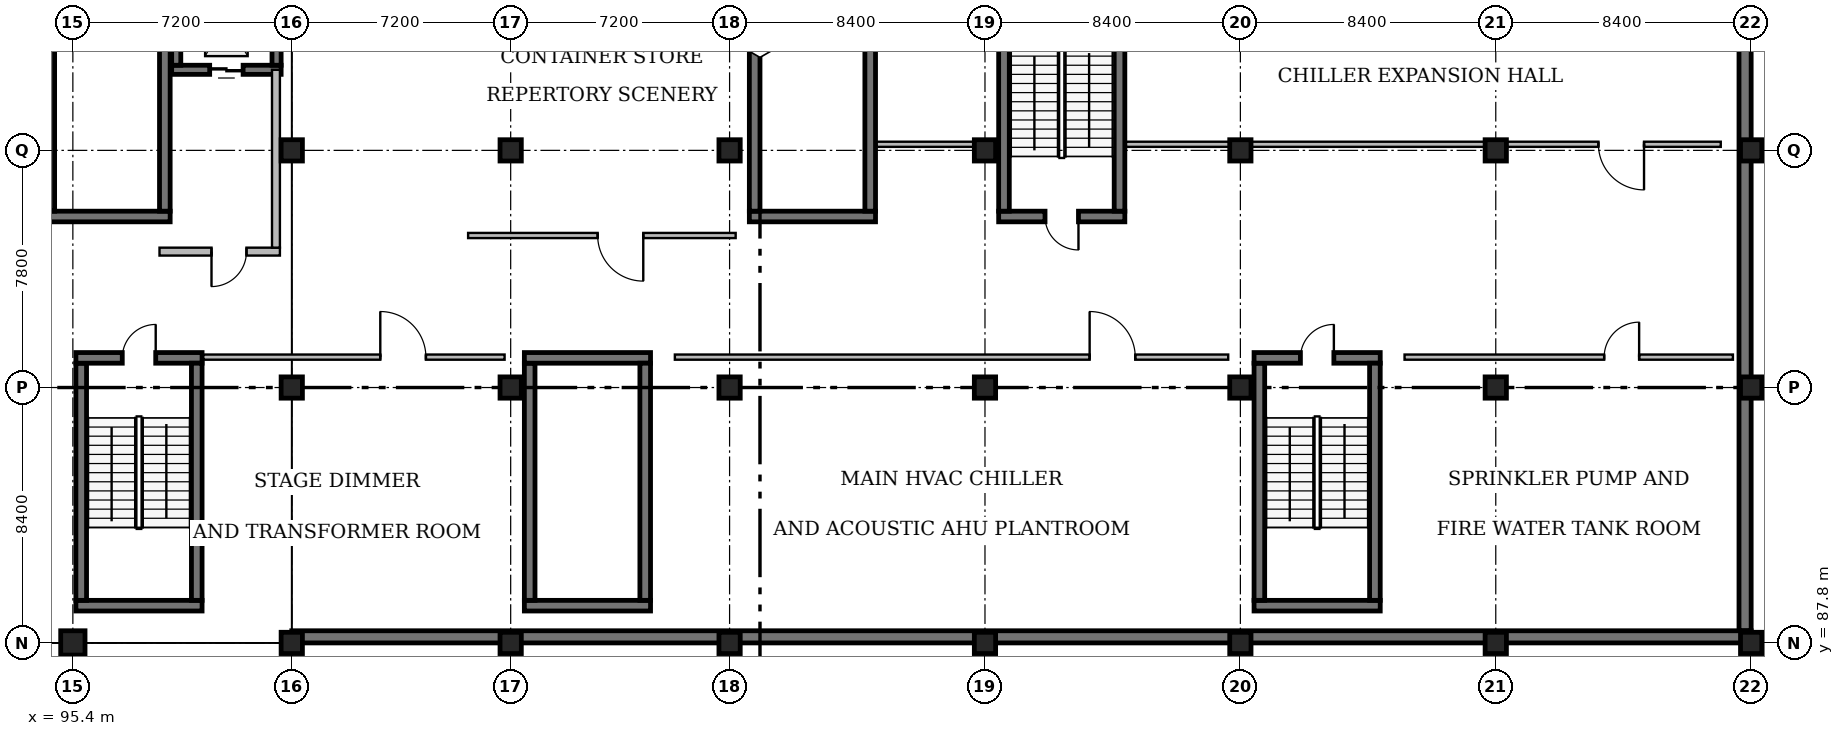
"""IFC4 building model, lengths in metres.
Left out: names, types, materials, properties, quantities, classifications, styles, units other than length and angle.
Written with IfcOpenShell. Run it as: python <this file> out.ifc"""

import sys

from ifc_helpers import new_model, si_unit, direction, frame, frame_2d, origin, origin_2d, place, context, subcontext, project, spatial, rectangle, extrude, element, fill, save


model = new_model("IFC4")
c1 = context("Model", 3, precision=1e-05, world=origin(), true_north=direction((0.0, 1.0)))
c2 = subcontext(c1, "Body", "Model", "MODEL_VIEW")
j1 = project(units=[si_unit("LENGTHUNIT", "METRE"), si_unit("PLANEANGLEUNIT", "RADIAN")], contexts=[c1])
p1 = place(None, origin())
s1 = spatial("IfcSite", under=j1, at=p1, CompositionType="ELEMENT")
p2 = place(p1, origin())
s2 = spatial("IfcBuilding", under=s1, at=p2, CompositionType="ELEMENT")
p3 = place(p2, frame((0.0, 0.0, -4.8)))
s3 = spatial("IfcBuildingStorey", under=s2, at=p3, CompositionType="ELEMENT", Elevation=-4.8)
p4 = place(p3, frame((95.4, 87.8, 0.0), z_axis=(0.0, 0.0, 1.0), x_axis=(1.0, 0.0, 0.0)))
e1 = element("IfcColumn", 1, at=p4, inside=s3, PredefinedType="COLUMN", context=c2, shape_type="SweptSolid", body=[
    extrude(rectangle(XDim=0.8, YDim=0.8, at=origin_2d()), origin(), (0.0, 0.0, 1.0), 4.8),
])
for number, where, z_axis, x_axis in (
    (2, (102.6, 87.8, 0.0), (0.0, 0.0, 1.0), (1.0, 0.0, 0.0)),
    (3, (102.6, 96.2, 0.0), (0.0, 0.0, 1.0), (1.0, 0.0, 0.0)),
    (4, (102.6, 104.0, 0.0), (0.0, 0.0, 1.0), (1.0, 0.0, 0.0)),
    (5, (109.8, 87.8, 0.0), (0.0, 0.0, 1.0), (1.0, 0.0, 0.0)),
    (6, (109.8, 96.2, 0.0), (0.0, 0.0, 1.0), (1.0, 0.0, 0.0)),
    (7, (109.8, 104.0, 0.0), (0.0, 0.0, 1.0), (1.0, 0.0, 0.0)),
    (8, (117.0, 87.8, 0.0), (0.0, 0.0, 1.0), (1.0, 0.0, 0.0)),
    (9, (117.0, 96.2, 0.0), (0.0, 0.0, 1.0), (1.0, 0.0, 0.0)),
    (10, (117.0, 104.0, 0.0), (0.0, 0.0, 1.0), (1.0, 0.0, 0.0)),
    (11, (125.4, 87.8, 0.0), (0.0, 0.0, 1.0), (1.0, 0.0, 0.0)),
    (12, (125.4, 96.2, 0.0), (0.0, 0.0, 1.0), (1.0, 0.0, 0.0)),
    (13, (125.4, 104.0, 0.0), (0.0, 0.0, 1.0), (1.0, 0.0, 0.0)),
    (14, (133.8, 87.8, 0.0), (0.0, 0.0, 1.0), (1.0, 0.0, 0.0)),
    (15, (133.8, 96.2, 0.0), (0.0, 0.0, 1.0), (1.0, 0.0, 0.0)),
    (16, (133.8, 104.0, 0.0), (0.0, 0.0, 1.0), (1.0, 0.0, 0.0)),
    (17, (142.2, 87.8, 0.0), (0.0, 0.0, 1.0), (1.0, 0.0, 0.0)),
    (18, (142.2, 96.2, 0.0), (0.0, 0.0, 1.0), (1.0, 0.0, 0.0)),
    (19, (142.2, 104.0, 0.0), (0.0, 0.0, 1.0), (1.0, 0.0, 0.0)),
    (20, (150.6, 87.8, 0.0), (0.0, 0.0, 1.0), (1.0, 0.0, 0.0)),
    (21, (150.6, 96.2, 0.0), (0.0, 0.0, 1.0), (1.0, 0.0, 0.0)),
    (22, (150.6, 104.0, 0.0), (0.0, 0.0, 1.0), (1.0, 0.0, 0.0)),
):
    element("IfcColumn", number, at=place(p3, frame(where, z_axis=z_axis, x_axis=x_axis)), inside=s3, PredefinedType="COLUMN", context=c2, shape_type="SweptSolid", body=[
        extrude(rectangle(XDim=0.7, YDim=0.7, at=origin_2d()), origin(), (0.0, 0.0, 1.0), 4.8),
    ])
p5 = place(p3, frame((98.6, 101.825, 0.0), z_axis=(0.0, 0.0, 1.0), x_axis=(-1.0, 0.0, 0.0)))
e23 = element("IfcWall", 23, at=p5, inside=s3, PredefinedType="SOLIDWALL", context=c2, shape_type="SweptSolid", body=[
    extrude(rectangle(XDim=4.15, YDim=0.35, at=frame_2d((2.075, 0.0))), origin(), (0.0, 0.0, 1.0), 4.48),
])
for number, where, z_axis, x_axis in (
    (24, (94.625, 102.0, 0.0), (0.0, 0.0, 1.0), (0.0, 1.0, 0.0)),
    (25, (98.425, 109.8, 0.0), (0.0, 0.0, 1.0), (0.0, -1.0, 0.0)),
):
    element("IfcWall", number, at=place(p3, frame(where, z_axis=z_axis, x_axis=x_axis)), inside=s3, PredefinedType="SOLIDWALL", context=c2, shape_type="SweptSolid", body=[
        extrude(rectangle(XDim=7.8, YDim=0.35, at=frame_2d((3.9, 0.0))), origin(), (0.0, 0.0, 1.0), 4.48),
    ])
p6 = place(p3, frame((99.65, 89.025, 0.0), z_axis=(0.0, 0.0, 1.0), x_axis=(-1.0, 0.0, 0.0)))
e26 = element("IfcWall", 26, at=p6, inside=s3, PredefinedType="SOLIDWALL", context=c2, shape_type="SweptSolid", body=[
    extrude(rectangle(XDim=4.15, YDim=0.35, at=frame_2d((2.075, 0.0))), origin(), (0.0, 0.0, 1.0), 4.56),
])
p7 = place(p3, frame((95.675, 89.2, 0.0), z_axis=(0.0, 0.0, 1.0), x_axis=(0.0, 1.0, 0.0)))
e27 = element("IfcWall", 27, at=p7, inside=s3, PredefinedType="SOLIDWALL", context=c2, shape_type="SweptSolid", body=[
    extrude(rectangle(XDim=7.8, YDim=0.35, at=frame_2d((3.9, 0.0))), origin(), (0.0, 0.0, 1.0), 4.56),
])
p8 = place(p3, frame((95.5, 97.175, 0.0), z_axis=(0.0, 0.0, 1.0), x_axis=(1.0, 0.0, 0.0)))
e28 = element("IfcWall", 28, at=p8, inside=s3, PredefinedType="SOLIDWALL", context=c2, shape_type="SweptSolid", body=[
    extrude(rectangle(XDim=4.15, YDim=0.35, at=frame_2d((2.075, 0.0))), origin(), (0.0, 0.0, 1.0), 4.56),
])
p9 = place(p8, frame((1.525, 0.0, 0.0)))
e29 = element("IfcOpeningElement", 29, at=p9, cuts=e28, PredefinedType="OPENING", context=c2, shape_type="SweptSolid", body=[
    extrude(rectangle(XDim=1.1, YDim=2.15, at=frame_2d((0.55, 1.075))), frame((0.0, 0.195, 0.0), z_axis=(0.0, -1.0, 0.0), x_axis=(1.0, 0.0, 0.0)), (0.0, 0.0, 1.0), 0.39),
])
p10 = place(p3, frame((99.475, 97.0, 0.0), z_axis=(0.0, 0.0, 1.0), x_axis=(0.0, -1.0, 0.0)))
e30 = element("IfcWall", 30, at=p10, inside=s3, PredefinedType="SOLIDWALL", context=c2, shape_type="SweptSolid", body=[
    extrude(rectangle(XDim=7.8, YDim=0.35, at=frame_2d((3.9, 0.0))), origin(), (0.0, 0.0, 1.0), 4.56),
])
p11 = place(p3, frame((102.25, 106.65, 0.0), z_axis=(0.0, 0.0, 1.0), x_axis=(-1.0, 0.0, 0.0)))
e31 = element("IfcWall", 31, at=p11, inside=s3, PredefinedType="SOLIDWALL", context=c2, shape_type="SweptSolid", body=[
    extrude(rectangle(XDim=3.6, YDim=0.3, at=frame_2d((1.8, 0.0))), origin(), (0.0, 0.0, 1.0), 4.8),
])
p12 = place(p11, frame((1.25, 0.0, 0.0)))
e32 = element("IfcOpeningElement", 32, at=p12, cuts=e31, PredefinedType="OPENING", context=c2, shape_type="SweptSolid", body=[
    extrude(rectangle(XDim=1.1, YDim=2.1, at=frame_2d((0.55, 1.05))), frame((0.0, 0.17, 0.0), z_axis=(0.0, -1.0, 0.0), x_axis=(1.0, 0.0, 0.0)), (0.0, 0.0, 1.0), 0.34),
])
for number, where, z_axis, x_axis in (
    (33, (98.8, 106.8, 0.0), (0.0, 0.0, 1.0), (0.0, 1.0, 0.0)),
    (34, (102.1, 109.8, 0.0), (0.0, 0.0, 1.0), (0.0, -1.0, 0.0)),
):
    element("IfcWall", number, at=place(p3, frame(where, z_axis=z_axis, x_axis=x_axis)), inside=s3, PredefinedType="SOLIDWALL", context=c2, shape_type="SweptSolid", body=[
        extrude(rectangle(XDim=3.0, YDim=0.3, at=frame_2d((1.5, 0.0))), origin(), (0.0, 0.0, 1.0), 4.8),
    ])
p13 = place(p3, frame((102.21, 100.67, 0.0), z_axis=(0.0, 0.0, 1.0), x_axis=(-1.0, 0.0, 0.0)))
e35 = element("IfcWall", 35, at=p13, inside=s3, PredefinedType="SOLIDWALL", context=c2, shape_type="SweptSolid", body=[
    extrude(rectangle(XDim=3.96, YDim=0.26, at=frame_2d((1.98, 0.0))), origin(), (0.0, 0.0, 1.0), 4.48),
])
p14 = place(p13, frame((1.1, 0.0, 0.0)))
e36 = element("IfcOpeningElement", 36, at=p14, cuts=e35, PredefinedType="OPENING", context=c2, shape_type="SweptSolid", body=[
    extrude(rectangle(XDim=1.15, YDim=2.2, at=frame_2d((0.575, 1.1))), frame((0.0, 0.15, 0.0), z_axis=(0.0, -1.0, 0.0), x_axis=(1.0, 0.0, 0.0)), (0.0, 0.0, 1.0), 0.3),
])
p15 = place(p3, frame((102.08, 106.65, 0.0), z_axis=(0.0, 0.0, 1.0), x_axis=(0.0, -1.0, 0.0)))
e37 = element("IfcWall", 37, at=p15, inside=s3, PredefinedType="SOLIDWALL", context=c2, shape_type="SweptSolid", body=[
    extrude(rectangle(XDim=5.85, YDim=0.26, at=frame_2d((2.925, 0.0))), origin(), (0.0, 0.0, 1.0), 4.48),
])
p16 = place(p3, frame((121.8, 101.825, 0.0), z_axis=(0.0, 0.0, 1.0), x_axis=(-1.0, 0.0, 0.0)))
e38 = element("IfcWall", 38, at=p16, inside=s3, PredefinedType="SOLIDWALL", context=c2, shape_type="SweptSolid", body=[
    extrude(rectangle(XDim=4.15, YDim=0.35, at=frame_2d((2.075, 0.0))), origin(), (0.0, 0.0, 1.0), 4.48),
])
for number, where, z_axis, x_axis in (
    (39, (117.825, 102.0, 0.0), (0.0, 0.0, 1.0), (0.0, 1.0, 0.0)),
    (40, (121.625, 109.8, 0.0), (0.0, 0.0, 1.0), (0.0, -1.0, 0.0)),
):
    element("IfcWall", number, at=place(p3, frame(where, z_axis=z_axis, x_axis=x_axis)), inside=s3, PredefinedType="SOLIDWALL", context=c2, shape_type="SweptSolid", body=[
        extrude(rectangle(XDim=7.8, YDim=0.35, at=frame_2d((3.9, 0.0))), origin(), (0.0, 0.0, 1.0), 4.48),
    ])
p17 = place(p3, frame((130.0, 101.825, 0.0), z_axis=(0.0, 0.0, 1.0), x_axis=(-1.0, 0.0, 0.0)))
e41 = element("IfcWall", 41, at=p17, inside=s3, PredefinedType="SOLIDWALL", context=c2, shape_type="SweptSolid", body=[
    extrude(rectangle(XDim=4.15, YDim=0.35, at=frame_2d((2.075, 0.0))), origin(), (0.0, 0.0, 1.0), 4.56),
])
p18 = place(p17, frame((1.525, 0.0, 0.0)))
e42 = element("IfcOpeningElement", 42, at=p18, cuts=e41, PredefinedType="OPENING", context=c2, shape_type="SweptSolid", body=[
    extrude(rectangle(XDim=1.1, YDim=2.15, at=frame_2d((0.55, 1.075))), frame((0.0, 0.195, 0.0), z_axis=(0.0, -1.0, 0.0), x_axis=(1.0, 0.0, 0.0)), (0.0, 0.0, 1.0), 0.39),
])
for number, where, z_axis, x_axis in (
    (43, (126.025, 102.0, 0.0), (0.0, 0.0, 1.0), (0.0, 1.0, 0.0)),
    (44, (129.825, 109.8, 0.0), (0.0, 0.0, 1.0), (0.0, -1.0, 0.0)),
):
    element("IfcWall", number, at=place(p3, frame(where, z_axis=z_axis, x_axis=x_axis)), inside=s3, PredefinedType="SOLIDWALL", context=c2, shape_type="SweptSolid", body=[
        extrude(rectangle(XDim=7.8, YDim=0.35, at=frame_2d((3.9, 0.0))), origin(), (0.0, 0.0, 1.0), 4.56),
    ])
p19 = place(p3, frame((114.4, 89.025, 0.0), z_axis=(0.0, 0.0, 1.0), x_axis=(-1.0, 0.0, 0.0)))
e45 = element("IfcWall", 45, at=p19, inside=s3, PredefinedType="SOLIDWALL", context=c2, shape_type="SweptSolid", body=[
    extrude(rectangle(XDim=4.15, YDim=0.35, at=frame_2d((2.075, 0.0))), origin(), (0.0, 0.0, 1.0), 4.48),
])
p20 = place(p3, frame((110.425, 89.2, 0.0), z_axis=(0.0, 0.0, 1.0), x_axis=(0.0, 1.0, 0.0)))
e46 = element("IfcWall", 46, at=p20, inside=s3, PredefinedType="SOLIDWALL", context=c2, shape_type="SweptSolid", body=[
    extrude(rectangle(XDim=7.8, YDim=0.35, at=frame_2d((3.9, 0.0))), origin(), (0.0, 0.0, 1.0), 4.48),
])
p21 = place(p3, frame((110.25, 97.175, 0.0), z_axis=(0.0, 0.0, 1.0), x_axis=(1.0, 0.0, 0.0)))
e47 = element("IfcWall", 47, at=p21, inside=s3, PredefinedType="SOLIDWALL", context=c2, shape_type="SweptSolid", body=[
    extrude(rectangle(XDim=4.15, YDim=0.35, at=frame_2d((2.075, 0.0))), origin(), (0.0, 0.0, 1.0), 4.48),
])
p22 = place(p3, frame((114.225, 97.0, 0.0), z_axis=(0.0, 0.0, 1.0), x_axis=(0.0, -1.0, 0.0)))
e48 = element("IfcWall", 48, at=p22, inside=s3, PredefinedType="SOLIDWALL", context=c2, shape_type="SweptSolid", body=[
    extrude(rectangle(XDim=7.8, YDim=0.35, at=frame_2d((3.9, 0.0))), origin(), (0.0, 0.0, 1.0), 4.48),
])
p23 = place(p3, frame((138.4, 89.025, 0.0), z_axis=(0.0, 0.0, 1.0), x_axis=(-1.0, 0.0, 0.0)))
e49 = element("IfcWall", 49, at=p23, inside=s3, PredefinedType="SOLIDWALL", context=c2, shape_type="SweptSolid", body=[
    extrude(rectangle(XDim=4.15, YDim=0.35, at=frame_2d((2.075, 0.0))), origin(), (0.0, 0.0, 1.0), 4.56),
])
p24 = place(p3, frame((134.425, 89.2, 0.0), z_axis=(0.0, 0.0, 1.0), x_axis=(0.0, 1.0, 0.0)))
e50 = element("IfcWall", 50, at=p24, inside=s3, PredefinedType="SOLIDWALL", context=c2, shape_type="SweptSolid", body=[
    extrude(rectangle(XDim=7.8, YDim=0.35, at=frame_2d((3.9, 0.0))), origin(), (0.0, 0.0, 1.0), 4.56),
])
p25 = place(p3, frame((134.25, 97.175, 0.0), z_axis=(0.0, 0.0, 1.0), x_axis=(1.0, 0.0, 0.0)))
e51 = element("IfcWall", 51, at=p25, inside=s3, PredefinedType="SOLIDWALL", context=c2, shape_type="SweptSolid", body=[
    extrude(rectangle(XDim=4.15, YDim=0.35, at=frame_2d((2.075, 0.0))), origin(), (0.0, 0.0, 1.0), 4.56),
])
p26 = place(p25, frame((1.525, 0.0, 0.0)))
e52 = element("IfcOpeningElement", 52, at=p26, cuts=e51, PredefinedType="OPENING", context=c2, shape_type="SweptSolid", body=[
    extrude(rectangle(XDim=1.1, YDim=2.15, at=frame_2d((0.55, 1.075))), frame((0.0, 0.195, 0.0), z_axis=(0.0, -1.0, 0.0), x_axis=(1.0, 0.0, 0.0)), (0.0, 0.0, 1.0), 0.39),
])
p27 = place(p3, frame((138.225, 97.0, 0.0), z_axis=(0.0, 0.0, 1.0), x_axis=(0.0, -1.0, 0.0)))
e53 = element("IfcWall", 53, at=p27, inside=s3, PredefinedType="SOLIDWALL", context=c2, shape_type="SweptSolid", body=[
    extrude(rectangle(XDim=7.8, YDim=0.35, at=frame_2d((3.9, 0.0))), origin(), (0.0, 0.0, 1.0), 4.56),
])
p28 = place(p3, frame((150.4, 88.2, 0.0), z_axis=(0.0, 0.0, 1.0), x_axis=(0.0, 1.0, 0.0)))
e54 = element("IfcWall", 54, at=p28, inside=s3, PredefinedType="SOLIDWALL", context=c2, shape_type="SweptSolid", body=[
    extrude(rectangle(XDim=23.2, YDim=0.4, at=frame_2d((11.6, 0.0))), origin(), (0.0, 0.0, 1.0), 4.48),
])
p29 = place(p3, frame((102.6, 88.0, 0.0), z_axis=(0.0, 0.0, 1.0), x_axis=(1.0, 0.0, 0.0)))
e55 = element("IfcWall", 55, at=p29, inside=s3, PredefinedType="SOLIDWALL", context=c2, shape_type="SweptSolid", body=[
    extrude(rectangle(XDim=48.0, YDim=0.4, at=frame_2d((24.0, 0.0))), origin(), (0.0, 0.0, 1.0), 4.48),
])
p30 = place(p3, frame((99.69, 97.2, 0.0), z_axis=(0.0, 0.0, 1.0), x_axis=(1.0, 0.0, 0.0)))
e56 = element("IfcWall", 56, at=p30, inside=s3, PredefinedType="PARTITIONING", context=c2, shape_type="SweptSolid", body=[
    extrude(rectangle(XDim=9.91, YDim=0.17, at=frame_2d((4.955, 0.0))), origin(), (0.0, 0.0, 1.0), 4.48),
])
p31 = place(p30, frame((5.822, 0.0, 0.0)))
e57 = element("IfcOpeningElement", 57, at=p31, cuts=e56, PredefinedType="OPENING", context=c2, shape_type="SweptSolid", body=[
    extrude(rectangle(XDim=1.5, YDim=2.2, at=frame_2d((0.75, 1.1))), frame((0.0, 0.105, 0.0), z_axis=(0.0, -1.0, 0.0), x_axis=(1.0, 0.0, 0.0)), (0.0, 0.0, 1.0), 0.21),
])
p32 = place(p3, frame((115.2, 97.2, 0.0), z_axis=(0.0, 0.0, 1.0), x_axis=(1.0, 0.0, 0.0)))
e58 = element("IfcWall", 58, at=p32, inside=s3, PredefinedType="PARTITIONING", context=c2, shape_type="SweptSolid", body=[
    extrude(rectangle(XDim=18.2, YDim=0.17, at=frame_2d((9.1, 0.0))), origin(), (0.0, 0.0, 1.0), 4.48),
])
p33 = place(p32, frame((13.642, 0.0, 0.0)))
e59 = element("IfcOpeningElement", 59, at=p33, cuts=e58, PredefinedType="OPENING", context=c2, shape_type="SweptSolid", body=[
    extrude(rectangle(XDim=1.5, YDim=2.2, at=frame_2d((0.75, 1.1))), frame((0.0, 0.105, 0.0), z_axis=(0.0, -1.0, 0.0), x_axis=(1.0, 0.0, 0.0)), (0.0, 0.0, 1.0), 0.21),
])
p34 = place(p3, frame((139.2, 97.2, 0.0), z_axis=(0.0, 0.0, 1.0), x_axis=(1.0, 0.0, 0.0)))
e60 = element("IfcWall", 60, at=p34, inside=s3, PredefinedType="PARTITIONING", context=c2, shape_type="SweptSolid", body=[
    extrude(rectangle(XDim=10.8, YDim=0.17, at=frame_2d((5.4, 0.0))), origin(), (0.0, 0.0, 1.0), 4.48),
])
p35 = place(p34, frame((6.565, 0.0, 0.0)))
e61 = element("IfcOpeningElement", 61, at=p35, cuts=e60, PredefinedType="OPENING", context=c2, shape_type="SweptSolid", body=[
    extrude(rectangle(XDim=1.15, YDim=2.15, at=frame_2d((0.575, 1.075))), frame((0.0, 0.105, 0.0), z_axis=(0.0, -1.0, 0.0), x_axis=(1.0, 0.0, 0.0)), (0.0, 0.0, 1.0), 0.21),
])
p36 = place(p3, frame((117.2, 101.2, 0.0), z_axis=(0.0, 0.0, 1.0), x_axis=(-1.0, 0.0, 0.0)))
e62 = element("IfcWall", 62, at=p36, inside=s3, PredefinedType="PARTITIONING", context=c2, shape_type="SweptSolid", body=[
    extrude(rectangle(XDim=8.8, YDim=0.17, at=frame_2d((4.4, 0.0))), origin(), (0.0, 0.0, 1.0), 4.48),
])
p37 = place(p36, frame((3.039, 0.0, 0.0)))
e63 = element("IfcOpeningElement", 63, at=p37, cuts=e62, PredefinedType="OPENING", context=c2, shape_type="SweptSolid", body=[
    extrude(rectangle(XDim=1.5, YDim=2.2, at=frame_2d((0.75, 1.1))), frame((0.0, 0.105, 0.0), z_axis=(0.0, -1.0, 0.0), x_axis=(1.0, 0.0, 0.0)), (0.0, 0.0, 1.0), 0.21),
])
p38 = place(p3, frame((149.6, 104.2, 0.0), z_axis=(0.0, 0.0, 1.0), x_axis=(-1.0, 0.0, 0.0)))
e64 = element("IfcWall", 64, at=p38, inside=s3, PredefinedType="PARTITIONING", context=c2, shape_type="SweptSolid", body=[
    extrude(rectangle(XDim=7.03, YDim=0.17, at=frame_2d((3.515, 0.0))), origin(), (0.0, 0.0, 1.0), 3.75),
])
p39 = place(p38, frame((2.523, 0.0, 0.0)))
e65 = element("IfcOpeningElement", 65, at=p39, cuts=e64, PredefinedType="OPENING", context=c2, shape_type="SweptSolid", body=[
    extrude(rectangle(XDim=1.5, YDim=2.2, at=frame_2d((0.75, 1.1))), frame((0.0, 0.105, 0.0), z_axis=(0.0, -1.0, 0.0), x_axis=(1.0, 0.0, 0.0)), (0.0, 0.0, 1.0), 0.21),
])
p40 = place(p3, frame((141.83, 104.2, 0.0), z_axis=(0.0, 0.0, 1.0), x_axis=(-1.0, 0.0, 0.0)))
e66 = element("IfcWall", 66, at=p40, inside=s3, PredefinedType="PARTITIONING", context=c2, shape_type="SweptSolid", body=[
    extrude(rectangle(XDim=7.66, YDim=0.17, at=frame_2d((3.83, 0.0))), origin(), (0.0, 0.0, 1.0), 3.75),
])
p41 = place(p3, frame((133.43, 104.2, 0.0), z_axis=(0.0, 0.0, 1.0), x_axis=(-1.0, 0.0, 0.0)))
e67 = element("IfcWall", 67, at=p41, inside=s3, PredefinedType="PARTITIONING", context=c2, shape_type="SweptSolid", body=[
    extrude(rectangle(XDim=3.39, YDim=0.17, at=frame_2d((1.695, 0.0))), origin(), (0.0, 0.0, 1.0), 4.48),
])
p42 = place(p3, frame((125.03, 104.2, 0.0), z_axis=(0.0, 0.0, 1.0), x_axis=(-1.0, 0.0, 0.0)))
e68 = element("IfcWall", 68, at=p42, inside=s3, PredefinedType="PARTITIONING", context=c2, shape_type="SweptSolid", body=[
    extrude(rectangle(XDim=3.19, YDim=0.17, at=frame_2d((1.595, 0.0))), origin(), (0.0, 0.0, 1.0), 4.48),
])
p43 = place(p9, origin())
e69 = element("IfcDoor", 69, at=p43, inside=s3, OperationType="SINGLE_SWING_RIGHT", PredefinedType="DOOR", context=c2, shape_type="SweptSolid", body=[
    extrude(rectangle(XDim=1.1, YDim=2.15, at=frame_2d((0.55, 1.075))), frame((0.0, 0.025, 0.0), z_axis=(0.0, -1.0, 0.0), x_axis=(1.0, 0.0, 0.0)), (0.0, 0.0, 1.0), 0.05),
])
fill(e29, e69)
p44 = place(p12, origin())
e70 = element("IfcDoor", 70, at=p44, inside=s3, OperationType="DOUBLE_DOOR_SLIDING", PredefinedType="DOOR", context=c2, shape_type="SweptSolid", body=[
    extrude(rectangle(XDim=1.1, YDim=2.1, at=frame_2d((0.55, 1.05))), frame((0.0, 0.025, 0.0), z_axis=(0.0, -1.0, 0.0), x_axis=(1.0, 0.0, 0.0)), (0.0, 0.0, 1.0), 0.05),
])
fill(e32, e70)
p45 = place(p14, origin())
e71 = element("IfcDoor", 71, at=p45, inside=s3, OperationType="SINGLE_SWING_RIGHT", PredefinedType="DOOR", context=c2, shape_type="SweptSolid", body=[
    extrude(rectangle(XDim=1.15, YDim=2.2, at=frame_2d((0.575, 1.1))), frame((0.0, 0.025, 0.0), z_axis=(0.0, -1.0, 0.0), x_axis=(1.0, 0.0, 0.0)), (0.0, 0.0, 1.0), 0.05),
])
fill(e36, e71)
p46 = place(p18, origin())
e72 = element("IfcDoor", 72, at=p46, inside=s3, OperationType="SINGLE_SWING_LEFT", PredefinedType="DOOR", context=c2, shape_type="SweptSolid", body=[
    extrude(rectangle(XDim=1.1, YDim=2.15, at=frame_2d((0.55, 1.075))), frame((0.0, 0.025, 0.0), z_axis=(0.0, -1.0, 0.0), x_axis=(1.0, 0.0, 0.0)), (0.0, 0.0, 1.0), 0.05),
])
fill(e42, e72)
p47 = place(p26, origin())
e73 = element("IfcDoor", 73, at=p47, inside=s3, OperationType="SINGLE_SWING_RIGHT", PredefinedType="DOOR", context=c2, shape_type="SweptSolid", body=[
    extrude(rectangle(XDim=1.1, YDim=2.15, at=frame_2d((0.55, 1.075))), frame((0.0, 0.025, 0.0), z_axis=(0.0, -1.0, 0.0), x_axis=(1.0, 0.0, 0.0)), (0.0, 0.0, 1.0), 0.05),
])
fill(e52, e73)
p48 = place(p31, origin())
e74 = element("IfcDoor", 74, at=p48, inside=s3, OperationType="DOUBLE_DOOR_SINGLE_SWING", PredefinedType="DOOR", context=c2, shape_type="SweptSolid", body=[
    extrude(rectangle(XDim=1.5, YDim=2.2, at=frame_2d((0.75, 1.1))), frame((0.0, 0.025, 0.0), z_axis=(0.0, -1.0, 0.0), x_axis=(1.0, 0.0, 0.0)), (0.0, 0.0, 1.0), 0.05),
])
fill(e57, e74)
p49 = place(p33, origin())
e75 = element("IfcDoor", 75, at=p49, inside=s3, OperationType="DOUBLE_DOOR_SINGLE_SWING", PredefinedType="DOOR", context=c2, shape_type="SweptSolid", body=[
    extrude(rectangle(XDim=1.5, YDim=2.2, at=frame_2d((0.75, 1.1))), frame((0.0, 0.025, 0.0), z_axis=(0.0, -1.0, 0.0), x_axis=(1.0, 0.0, 0.0)), (0.0, 0.0, 1.0), 0.05),
])
fill(e59, e75)
p50 = place(p35, origin())
e76 = element("IfcDoor", 76, at=p50, inside=s3, OperationType="SINGLE_SWING_RIGHT", PredefinedType="DOOR", context=c2, shape_type="SweptSolid", body=[
    extrude(rectangle(XDim=1.15, YDim=2.15, at=frame_2d((0.575, 1.075))), frame((0.0, 0.025, 0.0), z_axis=(0.0, -1.0, 0.0), x_axis=(1.0, 0.0, 0.0)), (0.0, 0.0, 1.0), 0.05),
])
fill(e61, e76)
p51 = place(p37, origin())
e77 = element("IfcDoor", 77, at=p51, inside=s3, OperationType="DOUBLE_DOOR_SINGLE_SWING", PredefinedType="DOOR", context=c2, shape_type="SweptSolid", body=[
    extrude(rectangle(XDim=1.5, YDim=2.2, at=frame_2d((0.75, 1.1))), frame((0.0, 0.025, 0.0), z_axis=(0.0, -1.0, 0.0), x_axis=(1.0, 0.0, 0.0)), (0.0, 0.0, 1.0), 0.05),
])
fill(e63, e77)
p52 = place(p39, origin())
e78 = element("IfcDoor", 78, at=p52, inside=s3, OperationType="DOUBLE_DOOR_SINGLE_SWING", PredefinedType="DOOR", context=c2, shape_type="SweptSolid", body=[
    extrude(rectangle(XDim=1.5, YDim=2.2, at=frame_2d((0.75, 1.1))), frame((0.0, 0.025, 0.0), z_axis=(0.0, -1.0, 0.0), x_axis=(1.0, 0.0, 0.0)), (0.0, 0.0, 1.0), 0.05),
])
fill(e65, e78)
save(model, sys.argv[1])
